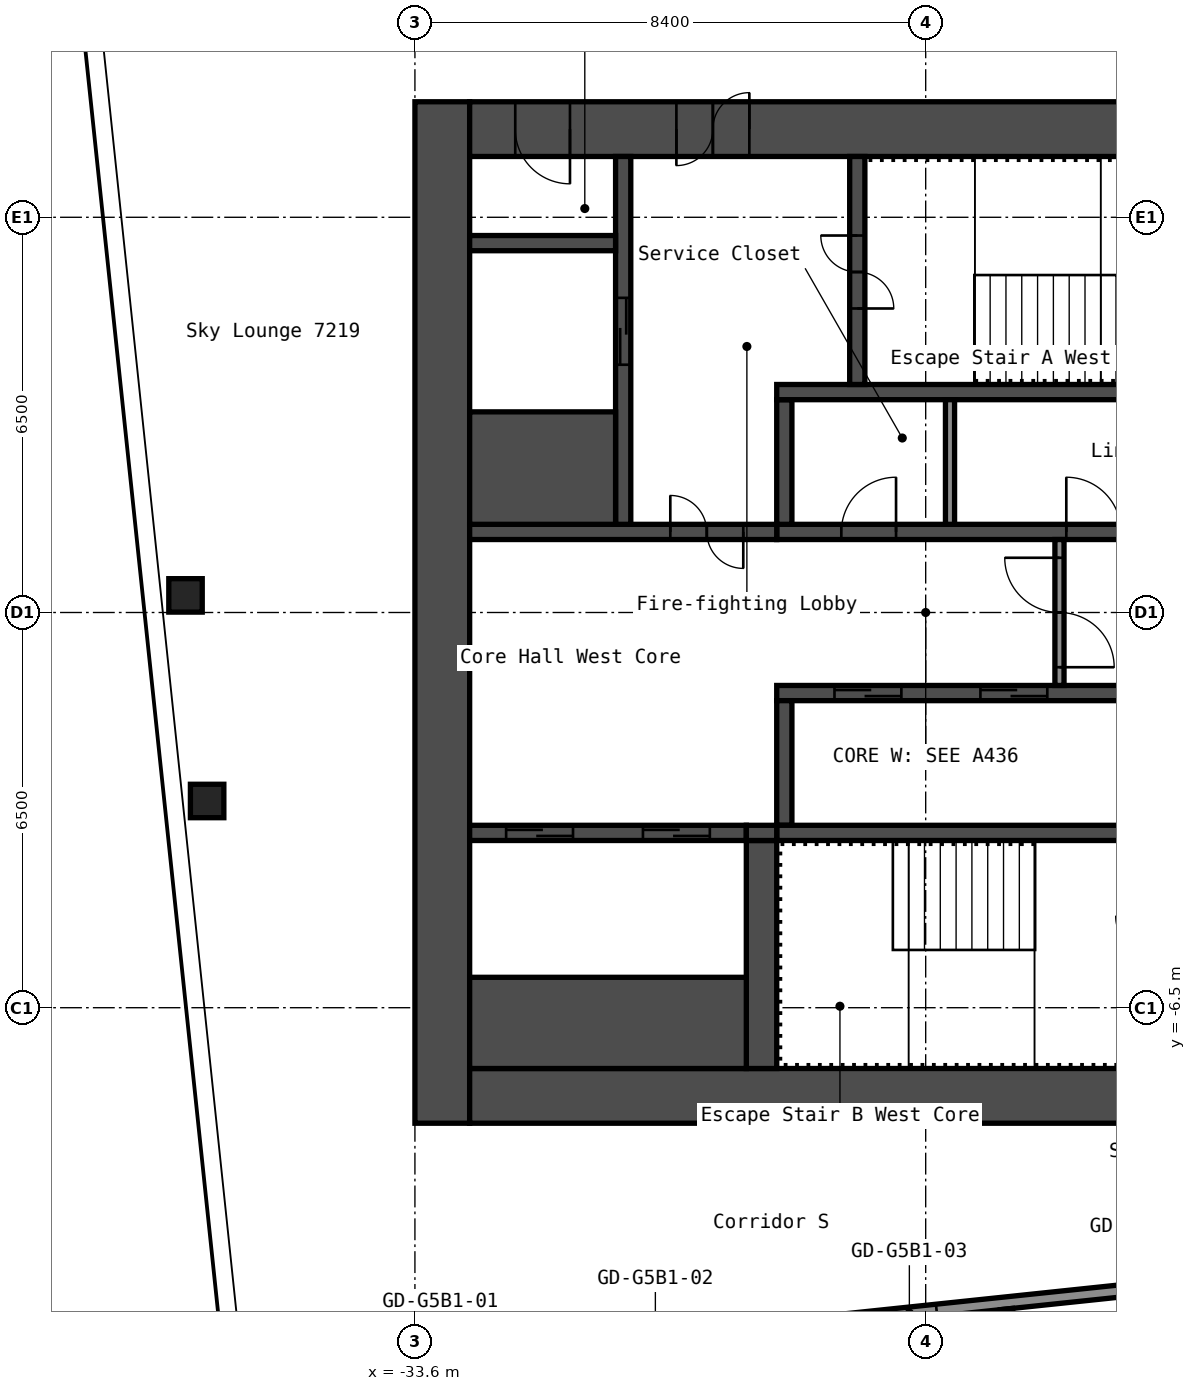
"""IFC4 building model, lengths in metres.
Left out: names, types, materials, properties, quantities, classifications, styles, units other than length and angle.
Written with IfcOpenShell. Run it as: python <this file> out.ifc"""

import sys

from ifc_helpers import new_model, si_unit, direction, frame, frame_2d, origin, origin_2d, place, context, subcontext, project, spatial, rectangle, hollow_rectangle, extrude, element, fill, save


model = new_model("IFC4")
c1 = context("Model", 3, precision=1e-05, world=origin(), true_north=direction((0.0, 1.0)))
c2 = subcontext(c1, "Body", "Model", "MODEL_VIEW")
j1 = project(units=[si_unit("LENGTHUNIT", "METRE"), si_unit("PLANEANGLEUNIT", "RADIAN")], contexts=[c1])
p1 = place(None, origin())
s1 = spatial("IfcSite", under=j1, at=p1, CompositionType="ELEMENT")
p2 = place(p1, origin())
s2 = spatial("IfcBuilding", under=s1, at=p2, CompositionType="ELEMENT")
p3 = place(p2, frame((0.0, 0.0, 255.0)))
s3 = spatial("IfcBuildingStorey", under=s2, at=p3, CompositionType="ELEMENT", Elevation=255.0)
for number, where, z_axis, x_axis in (
    (1, (-37.017, -3.1, 0.0), (0.0, 0.0, 1.0), (1.0, 0.0, 0.0)),
    (2, (-37.373, 0.281, 0.0), (0.0, 0.0, 1.0), (1.0, 0.0, 0.0)),
):
    element("IfcColumn", number, at=place(p3, frame(where, z_axis=z_axis, x_axis=x_axis)), inside=s3, PredefinedType="COLUMN", context=c2, shape_type="SweptSolid", body=[
        extrude(hollow_rectangle(XDim=0.55, YDim=0.55, WallThickness=0.022, InnerFilletRadius=0.033, OuterFilletRadius=0.055, at=origin_2d()), origin(), (0.0, 0.0, 1.0), 2.75),
    ])
p4 = place(p3, frame((-33.15, -8.4, 0.0), z_axis=(0.0, 0.0, 1.0), x_axis=(0.0, 1.0, 0.0)))
e3 = element("IfcWall", 3, at=p4, inside=s3, PredefinedType="SHEAR", context=c2, shape_type="SweptSolid", body=[
    extrude(rectangle(XDim=16.8, YDim=0.9, at=frame_2d((8.4, 0.0))), origin(), (0.0, 0.0, 1.0), 2.75),
])
p5 = place(p3, frame((-32.7, 7.95, 0.0), z_axis=(0.0, 0.0, 1.0), x_axis=(1.0, 0.0, 0.0)))
e4 = element("IfcWall", 4, at=p5, inside=s3, PredefinedType="SHEAR", context=c2, shape_type="SweptSolid", body=[
    extrude(rectangle(XDim=15.0, YDim=0.9, at=frame_2d((7.5, 0.0))), origin(), (0.0, 0.0, 1.0), 2.75),
])
p6 = place(p5, frame((3.4, 0.0, 0.0)))
e5 = element("IfcOpeningElement", 5, at=p6, cuts=e4, PredefinedType="OPENING", context=c2, shape_type="SweptSolid", body=[
    extrude(rectangle(XDim=1.2, YDim=2.1, at=frame_2d((0.6, 1.05))), frame((0.0, 0.46, 0.0), z_axis=(0.0, -1.0, 0.0), x_axis=(1.0, 0.0, 0.0)), (0.0, 0.0, 1.0), 0.92),
])
p7 = place(p5, frame((0.75, 0.0, 0.0)))
e6 = element("IfcOpeningElement", 6, at=p7, cuts=e4, PredefinedType="OPENING", context=c2, shape_type="SweptSolid", body=[
    extrude(rectangle(XDim=0.9, YDim=2.1, at=frame_2d((0.45, 1.05))), frame((0.0, 0.46, 0.0), z_axis=(0.0, -1.0, 0.0), x_axis=(1.0, 0.0, 0.0)), (0.0, 0.0, 1.0), 0.92),
])
p8 = place(p3, frame((-32.7, -7.95, 0.0), z_axis=(0.0, 0.0, 1.0), x_axis=(1.0, 0.0, 0.0)))
e7 = element("IfcWall", 7, at=p8, inside=s3, PredefinedType="SHEAR", context=c2, shape_type="SweptSolid", body=[
    extrude(rectangle(XDim=15.0, YDim=0.9, at=frame_2d((7.5, 0.0))), origin(), (0.0, 0.0, 1.0), 2.75),
])
p9 = place(p8, frame((11.45, 0.0, 0.0)))
e8 = element("IfcOpeningElement", 8, at=p9, cuts=e7, PredefinedType="OPENING", context=c2, shape_type="SweptSolid", body=[
    extrude(rectangle(XDim=1.0, YDim=2.1, at=frame_2d((0.5, 1.05))), frame((0.0, 0.46, 0.0), z_axis=(0.0, -1.0, 0.0), x_axis=(1.0, 0.0, 0.0)), (0.0, 0.0, 1.0), 0.92),
])
p10 = place(p3, frame((-27.65, 1.325, 0.0), z_axis=(0.0, 0.0, 1.0), x_axis=(1.0, 0.0, 0.0)))
e9 = element("IfcWall", 9, at=p10, inside=s3, PredefinedType="SHEAR", context=c2, shape_type="SweptSolid", body=[
    extrude(rectangle(XDim=7.5, YDim=0.25, at=frame_2d((3.75, 0.0))), origin(), (0.0, 0.0, 1.0), 2.75),
])
p11 = place(p10, frame((4.762, 0.0, 0.0)))
e10 = element("IfcOpeningElement", 10, at=p11, cuts=e9, PredefinedType="OPENING", context=c2, shape_type="SweptSolid", body=[
    extrude(rectangle(XDim=0.9, YDim=2.1, at=frame_2d((0.45, 1.05))), frame((0.0, 0.135, 0.0), z_axis=(0.0, -1.0, 0.0), x_axis=(1.0, 0.0, 0.0)), (0.0, 0.0, 1.0), 0.27),
])
p12 = place(p10, frame((1.062, 0.0, 0.0)))
e11 = element("IfcOpeningElement", 11, at=p12, cuts=e9, PredefinedType="OPENING", context=c2, shape_type="SweptSolid", body=[
    extrude(rectangle(XDim=0.9, YDim=2.1, at=frame_2d((0.45, 1.05))), frame((0.0, 0.135, 0.0), z_axis=(0.0, -1.0, 0.0), x_axis=(1.0, 0.0, 0.0)), (0.0, 0.0, 1.0), 0.27),
])
p13 = place(p3, frame((-27.525, 1.45, 0.0), z_axis=(0.0, 0.0, 1.0), x_axis=(0.0, 1.0, 0.0)))
e12 = element("IfcWall", 12, at=p13, inside=s3, PredefinedType="SHEAR", context=c2, shape_type="SweptSolid", body=[
    extrude(rectangle(XDim=2.05, YDim=0.25, at=frame_2d((1.025, 0.0))), origin(), (0.0, 0.0, 1.0), 2.75),
])
p14 = place(p3, frame((-27.65, 3.625, 0.0), z_axis=(0.0, 0.0, 1.0), x_axis=(1.0, 0.0, 0.0)))
e13 = element("IfcWall", 13, at=p14, inside=s3, PredefinedType="SHEAR", context=c2, shape_type="SweptSolid", body=[
    extrude(rectangle(XDim=7.5, YDim=0.25, at=frame_2d((3.75, 0.0))), origin(), (0.0, 0.0, 1.0), 2.75),
])
p15 = place(p3, frame((-26.325, 3.75, 0.0), z_axis=(0.0, 0.0, 1.0), x_axis=(0.0, 1.0, 0.0)))
e14 = element("IfcWall", 14, at=p15, inside=s3, PredefinedType="SHEAR", context=c2, shape_type="SweptSolid", body=[
    extrude(rectangle(XDim=3.75, YDim=0.25, at=frame_2d((1.875, 0.0))), origin(), (0.0, 0.0, 1.0), 2.75),
])
p16 = place(p15, frame((1.25, 0.0, 0.0)))
e15 = element("IfcOpeningElement", 15, at=p16, cuts=e14, PredefinedType="OPENING", context=c2, shape_type="SweptSolid", body=[
    extrude(rectangle(XDim=1.2, YDim=2.1, at=frame_2d((0.6, 1.05))), frame((0.0, 0.135, 0.0), z_axis=(0.0, -1.0, 0.0), x_axis=(1.0, 0.0, 0.0)), (0.0, 0.0, 1.0), 0.27),
])
p17 = place(p3, frame((-32.7, 1.325, 0.0), z_axis=(0.0, 0.0, 1.0), x_axis=(1.0, 0.0, 0.0)))
e16 = element("IfcWall", 16, at=p17, inside=s3, PredefinedType="SHEAR", context=c2, shape_type="SweptSolid", body=[
    extrude(rectangle(XDim=5.05, YDim=0.25, at=frame_2d((2.525, 0.0))), origin(), (0.0, 0.0, 1.0), 2.75),
])
p18 = place(p17, frame((3.3, 0.0, 0.0)))
e17 = element("IfcOpeningElement", 17, at=p18, cuts=e16, PredefinedType="OPENING", context=c2, shape_type="SweptSolid", body=[
    extrude(rectangle(XDim=1.2, YDim=2.1, at=frame_2d((0.6, 1.05))), frame((0.0, 0.135, 0.0), z_axis=(0.0, -1.0, 0.0), x_axis=(1.0, 0.0, 0.0)), (0.0, 0.0, 1.0), 0.27),
])
p19 = place(p3, frame((-30.175, 1.45, 0.0), z_axis=(0.0, 0.0, 1.0), x_axis=(0.0, 1.0, 0.0)))
e18 = element("IfcWall", 18, at=p19, inside=s3, PredefinedType="SHEAR", context=c2, shape_type="SweptSolid", body=[
    extrude(rectangle(XDim=6.05, YDim=0.25, at=frame_2d((3.025, 0.0))), origin(), (0.0, 0.0, 1.0), 2.75),
])
p20 = place(p19, frame((2.625, 0.0, 0.0)))
e19 = element("IfcOpeningElement", 19, at=p20, cuts=e18, PredefinedType="OPENING", context=c2, shape_type="SweptSolid", body=[
    extrude(rectangle(XDim=1.1, YDim=2.1, at=frame_2d((0.55, 1.05))), frame((0.0, 0.135, 0.0), z_axis=(0.0, -1.0, 0.0), x_axis=(1.0, 0.0, 0.0)), (0.0, 0.0, 1.0), 0.27),
])
p21 = place(p3, frame((-32.7, 2.375, 0.0), z_axis=(0.0, 0.0, 1.0), x_axis=(1.0, 0.0, 0.0)))
e20 = element("IfcWall", 20, at=p21, inside=s3, PredefinedType="SHEAR", context=c2, shape_type="SweptSolid", body=[
    extrude(rectangle(XDim=2.4, YDim=1.85, at=frame_2d((1.2, 0.0))), origin(), (0.0, 0.0, 1.0), 2.75),
])
p22 = place(p3, frame((-32.7, 6.075, 0.0), z_axis=(0.0, 0.0, 1.0), x_axis=(1.0, 0.0, 0.0)))
e21 = element("IfcWall", 21, at=p22, inside=s3, PredefinedType="SHEAR", context=c2, shape_type="SweptSolid", body=[
    extrude(rectangle(XDim=2.4, YDim=0.25, at=frame_2d((1.2, 0.0))), origin(), (0.0, 0.0, 1.0), 2.75),
])
p23 = place(p3, frame((-27.65, -1.325, 0.0), z_axis=(0.0, 0.0, 1.0), x_axis=(1.0, 0.0, 0.0)))
e22 = element("IfcWall", 22, at=p23, inside=s3, PredefinedType="SHEAR", context=c2, shape_type="SweptSolid", body=[
    extrude(rectangle(XDim=7.5, YDim=0.25, at=frame_2d((3.75, 0.0))), origin(), (0.0, 0.0, 1.0), 2.75),
])
p24 = place(p23, frame((5.75, 0.0, 0.0)))
e23 = element("IfcOpeningElement", 23, at=p24, cuts=e22, PredefinedType="OPENING", context=c2, shape_type="SweptSolid", body=[
    extrude(rectangle(XDim=1.1, YDim=2.1, at=frame_2d((0.55, 1.05))), frame((0.0, 0.135, 0.0), z_axis=(0.0, -1.0, 0.0), x_axis=(1.0, 0.0, 0.0)), (0.0, 0.0, 1.0), 0.27),
])
p25 = place(p23, frame((3.35, 0.0, 0.0)))
e24 = element("IfcOpeningElement", 24, at=p25, cuts=e22, PredefinedType="OPENING", context=c2, shape_type="SweptSolid", body=[
    extrude(rectangle(XDim=1.1, YDim=2.1, at=frame_2d((0.55, 1.05))), frame((0.0, 0.135, 0.0), z_axis=(0.0, -1.0, 0.0), x_axis=(1.0, 0.0, 0.0)), (0.0, 0.0, 1.0), 0.27),
])
p26 = place(p23, frame((0.95, 0.0, 0.0)))
e25 = element("IfcOpeningElement", 25, at=p26, cuts=e22, PredefinedType="OPENING", context=c2, shape_type="SweptSolid", body=[
    extrude(rectangle(XDim=1.1, YDim=2.1, at=frame_2d((0.55, 1.05))), frame((0.0, 0.135, 0.0), z_axis=(0.0, -1.0, 0.0), x_axis=(1.0, 0.0, 0.0)), (0.0, 0.0, 1.0), 0.27),
])
p27 = place(p3, frame((-27.525, -3.5, 0.0), z_axis=(0.0, 0.0, 1.0), x_axis=(0.0, 1.0, 0.0)))
e26 = element("IfcWall", 26, at=p27, inside=s3, PredefinedType="SHEAR", context=c2, shape_type="SweptSolid", body=[
    extrude(rectangle(XDim=2.05, YDim=0.25, at=frame_2d((1.025, 0.0))), origin(), (0.0, 0.0, 1.0), 2.75),
])
p28 = place(p3, frame((-27.65, -3.625, 0.0), z_axis=(0.0, 0.0, 1.0), x_axis=(1.0, 0.0, 0.0)))
e27 = element("IfcWall", 27, at=p28, inside=s3, PredefinedType="SHEAR", context=c2, shape_type="SweptSolid", body=[
    extrude(rectangle(XDim=7.5, YDim=0.25, at=frame_2d((3.75, 0.0))), origin(), (0.0, 0.0, 1.0), 2.75),
])
p29 = place(p3, frame((-27.9, -7.5, 0.0), z_axis=(0.0, 0.0, 1.0), x_axis=(0.0, 1.0, 0.0)))
e28 = element("IfcWall", 28, at=p29, inside=s3, PredefinedType="SHEAR", context=c2, shape_type="SweptSolid", body=[
    extrude(rectangle(XDim=3.75, YDim=0.5, at=frame_2d((1.875, 0.0))), origin(), (0.0, 0.0, 1.0), 2.75),
])
p30 = place(p3, frame((-32.7, -3.625, 0.0), z_axis=(0.0, 0.0, 1.0), x_axis=(1.0, 0.0, 0.0)))
e29 = element("IfcWall", 29, at=p30, inside=s3, PredefinedType="SHEAR", context=c2, shape_type="SweptSolid", body=[
    extrude(rectangle(XDim=4.55, YDim=0.25, at=frame_2d((2.275, 0.0))), origin(), (0.0, 0.0, 1.0), 2.75),
])
p31 = place(p30, frame((2.85, 0.0, 0.0)))
e30 = element("IfcOpeningElement", 30, at=p31, cuts=e29, PredefinedType="OPENING", context=c2, shape_type="SweptSolid", body=[
    extrude(rectangle(XDim=1.1, YDim=2.1, at=frame_2d((0.55, 1.05))), frame((0.0, 0.135, 0.0), z_axis=(0.0, -1.0, 0.0), x_axis=(1.0, 0.0, 0.0)), (0.0, 0.0, 1.0), 0.27),
])
p32 = place(p30, frame((0.6, 0.0, 0.0)))
e31 = element("IfcOpeningElement", 31, at=p32, cuts=e29, PredefinedType="OPENING", context=c2, shape_type="SweptSolid", body=[
    extrude(rectangle(XDim=1.1, YDim=2.1, at=frame_2d((0.55, 1.05))), frame((0.0, 0.135, 0.0), z_axis=(0.0, -1.0, 0.0), x_axis=(1.0, 0.0, 0.0)), (0.0, 0.0, 1.0), 0.27),
])
p33 = place(p3, frame((-32.7, -6.75, 0.0), z_axis=(0.0, 0.0, 1.0), x_axis=(1.0, 0.0, 0.0)))
e32 = element("IfcWall", 32, at=p33, inside=s3, PredefinedType="SHEAR", context=c2, shape_type="SweptSolid", body=[
    extrude(rectangle(XDim=4.55, YDim=1.5, at=frame_2d((2.275, 0.0))), origin(), (0.0, 0.0, 1.0), 2.75),
])
p34 = place(p3, frame((-28.15, -3.625, 0.0), z_axis=(0.0, 0.0, 1.0), x_axis=(1.0, 0.0, 0.0)))
e33 = element("IfcWall", 33, at=p34, inside=s3, PredefinedType="SHEAR", context=c2, shape_type="SweptSolid", body=[
    extrude(rectangle(XDim=0.5, YDim=0.25, at=frame_2d((0.25, 0.0))), origin(), (0.0, 0.0, 1.0), 2.75),
])
p35 = place(p3, frame((-23.0, -1.2, 0.0), z_axis=(0.0, 0.0, 1.0), x_axis=(0.0, 1.0, 0.0)))
e34 = element("IfcWall", 34, at=p35, inside=s3, PredefinedType="PARTITIONING", context=c2, shape_type="SweptSolid", body=[
    extrude(rectangle(XDim=2.4, YDim=0.15, at=frame_2d((1.2, 0.0))), origin(), (0.0, 0.0, 1.0), 2.75),
])
p36 = place(p35, frame((0.3, 0.0, 0.0)))
e35 = element("IfcOpeningElement", 35, at=p36, cuts=e34, PredefinedType="OPENING", context=c2, shape_type="SweptSolid", body=[
    extrude(rectangle(XDim=1.8, YDim=2.1, at=frame_2d((0.9, 1.05))), frame((0.0, 0.085, 0.0), z_axis=(0.0, -1.0, 0.0), x_axis=(1.0, 0.0, 0.0)), (0.0, 0.0, 1.0), 0.17),
])
p37 = place(p3, frame((-24.8, 1.45, 0.0), z_axis=(0.0, 0.0, 1.0), x_axis=(0.0, 1.0, 0.0)))
e36 = element("IfcWall", 36, at=p37, inside=s3, PredefinedType="PARTITIONING", context=c2, shape_type="SweptSolid", body=[
    extrude(rectangle(XDim=2.05, YDim=0.15, at=frame_2d((1.025, 0.0))), origin(), (0.0, 0.0, 1.0), 2.75),
])
p38 = place(p3, frame((-36.712, -12.705, 0.0), z_axis=(0.0, 0.0, 1.0), x_axis=(0.994522460242, 0.104523088709, 0.0)))
e37 = element("IfcWall", 37, at=p38, inside=s3, PredefinedType="PARTITIONING", context=c2, shape_type="SweptSolid", body=[
    extrude(rectangle(XDim=21.3, YDim=0.2, at=frame_2d((10.65, 0.0))), origin(), (0.0, 0.0, 1.0), 2.75),
])
p39 = place(p38, frame((3.05, 0.0, 0.0)))
e38 = element("IfcOpeningElement", 38, at=p39, cuts=e37, PredefinedType="OPENING", context=c2, shape_type="SweptSolid", body=[
    extrude(rectangle(XDim=1.0, YDim=2.1, at=frame_2d((0.5, 1.05))), frame((0.0, 0.11, 0.0), z_axis=(0.0, -1.0, 0.0), x_axis=(1.0, 0.0, 0.0)), (0.0, 0.0, 1.0), 0.22),
])
p40 = place(p38, frame((6.655, 0.0, 0.0)))
e39 = element("IfcOpeningElement", 39, at=p40, cuts=e37, PredefinedType="OPENING", context=c2, shape_type="SweptSolid", body=[
    extrude(rectangle(XDim=0.9, YDim=2.1, at=frame_2d((0.45, 1.05))), frame((0.0, 0.11, 0.0), z_axis=(0.0, -1.0, 0.0), x_axis=(1.0, 0.0, 0.0)), (0.0, 0.0, 1.0), 0.22),
])
p41 = place(p38, frame((10.855, 0.0, 0.0)))
e40 = element("IfcOpeningElement", 40, at=p41, cuts=e37, PredefinedType="OPENING", context=c2, shape_type="SweptSolid", body=[
    extrude(rectangle(XDim=0.9, YDim=2.1, at=frame_2d((0.45, 1.05))), frame((0.0, 0.11, 0.0), z_axis=(0.0, -1.0, 0.0), x_axis=(1.0, 0.0, 0.0)), (0.0, 0.0, 1.0), 0.22),
])
p42 = place(p38, frame((14.8, 0.0, 0.0)))
e41 = element("IfcOpeningElement", 41, at=p42, cuts=e37, PredefinedType="OPENING", context=c2, shape_type="SweptSolid", body=[
    extrude(rectangle(XDim=0.9, YDim=2.1, at=frame_2d((0.45, 1.05))), frame((0.0, 0.11, 0.0), z_axis=(0.0, -1.0, 0.0), x_axis=(1.0, 0.0, 0.0)), (0.0, 0.0, 1.0), 0.22),
])
p43 = place(p38, frame((19.0, 0.0, 0.0)))
e42 = element("IfcOpeningElement", 42, at=p43, cuts=e37, PredefinedType="OPENING", context=c2, shape_type="SweptSolid", body=[
    extrude(rectangle(XDim=0.9, YDim=2.1, at=frame_2d((0.45, 1.05))), frame((0.0, 0.11, 0.0), z_axis=(0.0, -1.0, 0.0), x_axis=(1.0, 0.0, 0.0)), (0.0, 0.0, 1.0), 0.22),
])
p44 = place(p3, frame((-23.254, -17.339, 0.0), z_axis=(0.0, 0.0, 1.0), x_axis=(-0.10453655107, 0.994521045273, 0.0)))
e43 = element("IfcWall", 43, at=p44, inside=s3, PredefinedType="PARTITIONING", context=c2, shape_type="SweptSolid", body=[
    extrude(rectangle(XDim=5.916, YDim=0.2, at=frame_2d((2.958, 0.0))), origin(), (0.0, 0.0, 1.0), 2.75),
])
p45 = place(p6, origin())
e44 = element("IfcDoor", 44, at=p45, inside=s3, OperationType="DOUBLE_DOOR_SINGLE_SWING", PredefinedType="DOOR", context=c2, shape_type="SweptSolid", body=[
    extrude(rectangle(XDim=1.2, YDim=2.1, at=frame_2d((0.6, 1.05))), frame((0.0, 0.025, 0.0), z_axis=(0.0, -1.0, 0.0), x_axis=(1.0, 0.0, 0.0)), (0.0, 0.0, 1.0), 0.05),
])
fill(e5, e44)
p46 = place(p7, origin())
e45 = element("IfcDoor", 45, at=p46, inside=s3, OperationType="SINGLE_SWING_RIGHT", PredefinedType="DOOR", context=c2, shape_type="SweptSolid", body=[
    extrude(rectangle(XDim=0.9, YDim=2.1, at=frame_2d((0.45, 1.05))), frame((0.0, 0.025, 0.0), z_axis=(0.0, -1.0, 0.0), x_axis=(1.0, 0.0, 0.0)), (0.0, 0.0, 1.0), 0.05),
])
fill(e6, e45)
p47 = place(p16, origin())
e46 = element("IfcDoor", 46, at=p47, inside=s3, OperationType="DOUBLE_DOOR_SINGLE_SWING", PredefinedType="DOOR", context=c2, shape_type="SweptSolid", body=[
    extrude(rectangle(XDim=1.2, YDim=2.1, at=frame_2d((0.6, 1.05))), frame((0.0, 0.025, 0.0), z_axis=(0.0, -1.0, 0.0), x_axis=(1.0, 0.0, 0.0)), (0.0, 0.0, 1.0), 0.05),
])
fill(e15, e46)
p48 = place(p18, origin())
e47 = element("IfcDoor", 47, at=p48, inside=s3, OperationType="DOUBLE_DOOR_SINGLE_SWING", PredefinedType="DOOR", context=c2, shape_type="SweptSolid", body=[
    extrude(rectangle(XDim=1.2, YDim=2.1, at=frame_2d((0.6, 1.05))), frame((0.0, 0.025, 0.0), z_axis=(0.0, -1.0, 0.0), x_axis=(1.0, 0.0, 0.0)), (0.0, 0.0, 1.0), 0.05),
])
fill(e17, e47)
p49 = place(p36, origin())
e48 = element("IfcDoor", 48, at=p49, inside=s3, OperationType="DOUBLE_DOOR_SINGLE_SWING", PredefinedType="DOOR", context=c2, shape_type="SweptSolid", body=[
    extrude(rectangle(XDim=1.8, YDim=2.1, at=frame_2d((0.9, 1.05))), frame((0.0, 0.025, 0.0), z_axis=(0.0, -1.0, 0.0), x_axis=(1.0, 0.0, 0.0)), (0.0, 0.0, 1.0), 0.05),
])
fill(e35, e48)
p50 = place(p11, origin())
e49 = element("IfcDoor", 49, at=p50, inside=s3, OperationType="SINGLE_SWING_RIGHT", PredefinedType="DOOR", context=c2, shape_type="SweptSolid", body=[
    extrude(rectangle(XDim=0.9, YDim=2.1, at=frame_2d((0.45, 1.05))), frame((0.0, 0.025, 0.0), z_axis=(0.0, -1.0, 0.0), x_axis=(1.0, 0.0, 0.0)), (0.0, 0.0, 1.0), 0.05),
])
fill(e10, e49)
p51 = place(p12, origin())
e50 = element("IfcDoor", 50, at=p51, inside=s3, OperationType="SINGLE_SWING_LEFT", PredefinedType="DOOR", context=c2, shape_type="SweptSolid", body=[
    extrude(rectangle(XDim=0.9, YDim=2.1, at=frame_2d((0.45, 1.05))), frame((0.0, 0.025, 0.0), z_axis=(0.0, -1.0, 0.0), x_axis=(1.0, 0.0, 0.0)), (0.0, 0.0, 1.0), 0.05),
])
fill(e11, e50)
p52 = place(p25, origin())
e51 = element("IfcDoor", 51, at=p52, inside=s3, OperationType="DOUBLE_DOOR_SLIDING", PredefinedType="DOOR", context=c2, shape_type="SweptSolid", body=[
    extrude(rectangle(XDim=1.1, YDim=2.1, at=frame_2d((0.55, 1.05))), frame((0.0, 0.025, 0.0), z_axis=(0.0, -1.0, 0.0), x_axis=(1.0, 0.0, 0.0)), (0.0, 0.0, 1.0), 0.05),
])
fill(e24, e51)
p53 = place(p26, origin())
e52 = element("IfcDoor", 52, at=p53, inside=s3, OperationType="DOUBLE_DOOR_SLIDING", PredefinedType="DOOR", context=c2, shape_type="SweptSolid", body=[
    extrude(rectangle(XDim=1.1, YDim=2.1, at=frame_2d((0.55, 1.05))), frame((0.0, 0.025, 0.0), z_axis=(0.0, -1.0, 0.0), x_axis=(1.0, 0.0, 0.0)), (0.0, 0.0, 1.0), 0.05),
])
fill(e25, e52)
p54 = place(p20, origin())
e53 = element("IfcDoor", 53, at=p54, inside=s3, OperationType="DOUBLE_DOOR_SLIDING", PredefinedType="DOOR", context=c2, shape_type="SweptSolid", body=[
    extrude(rectangle(XDim=1.1, YDim=2.1, at=frame_2d((0.55, 1.05))), frame((0.0, 0.025, 0.0), z_axis=(0.0, -1.0, 0.0), x_axis=(1.0, 0.0, 0.0)), (0.0, 0.0, 1.0), 0.05),
])
fill(e19, e53)
p55 = place(p31, origin())
e54 = element("IfcDoor", 54, at=p55, inside=s3, OperationType="DOUBLE_DOOR_SLIDING", PredefinedType="DOOR", context=c2, shape_type="SweptSolid", body=[
    extrude(rectangle(XDim=1.1, YDim=2.1, at=frame_2d((0.55, 1.05))), frame((0.0, 0.025, 0.0), z_axis=(0.0, -1.0, 0.0), x_axis=(1.0, 0.0, 0.0)), (0.0, 0.0, 1.0), 0.05),
])
fill(e30, e54)
p56 = place(p32, origin())
e55 = element("IfcDoor", 55, at=p56, inside=s3, OperationType="DOUBLE_DOOR_SLIDING", PredefinedType="DOOR", context=c2, shape_type="SweptSolid", body=[
    extrude(rectangle(XDim=1.1, YDim=2.1, at=frame_2d((0.55, 1.05))), frame((0.0, 0.025, 0.0), z_axis=(0.0, -1.0, 0.0), x_axis=(1.0, 0.0, 0.0)), (0.0, 0.0, 1.0), 0.05),
])
fill(e31, e55)
p57 = place(p41, origin())
e56 = element("IfcDoor", 56, at=p57, inside=s3, OperationType="SINGLE_SWING_LEFT", PredefinedType="DOOR", context=c2, shape_type="SweptSolid", body=[
    extrude(rectangle(XDim=0.9, YDim=2.1, at=frame_2d((0.45, 1.05))), frame((0.0, 0.025, 0.0), z_axis=(0.0, -1.0, 0.0), x_axis=(1.0, 0.0, 0.0)), (0.0, 0.0, 1.0), 0.05),
])
fill(e40, e56)
save(model, sys.argv[1])
